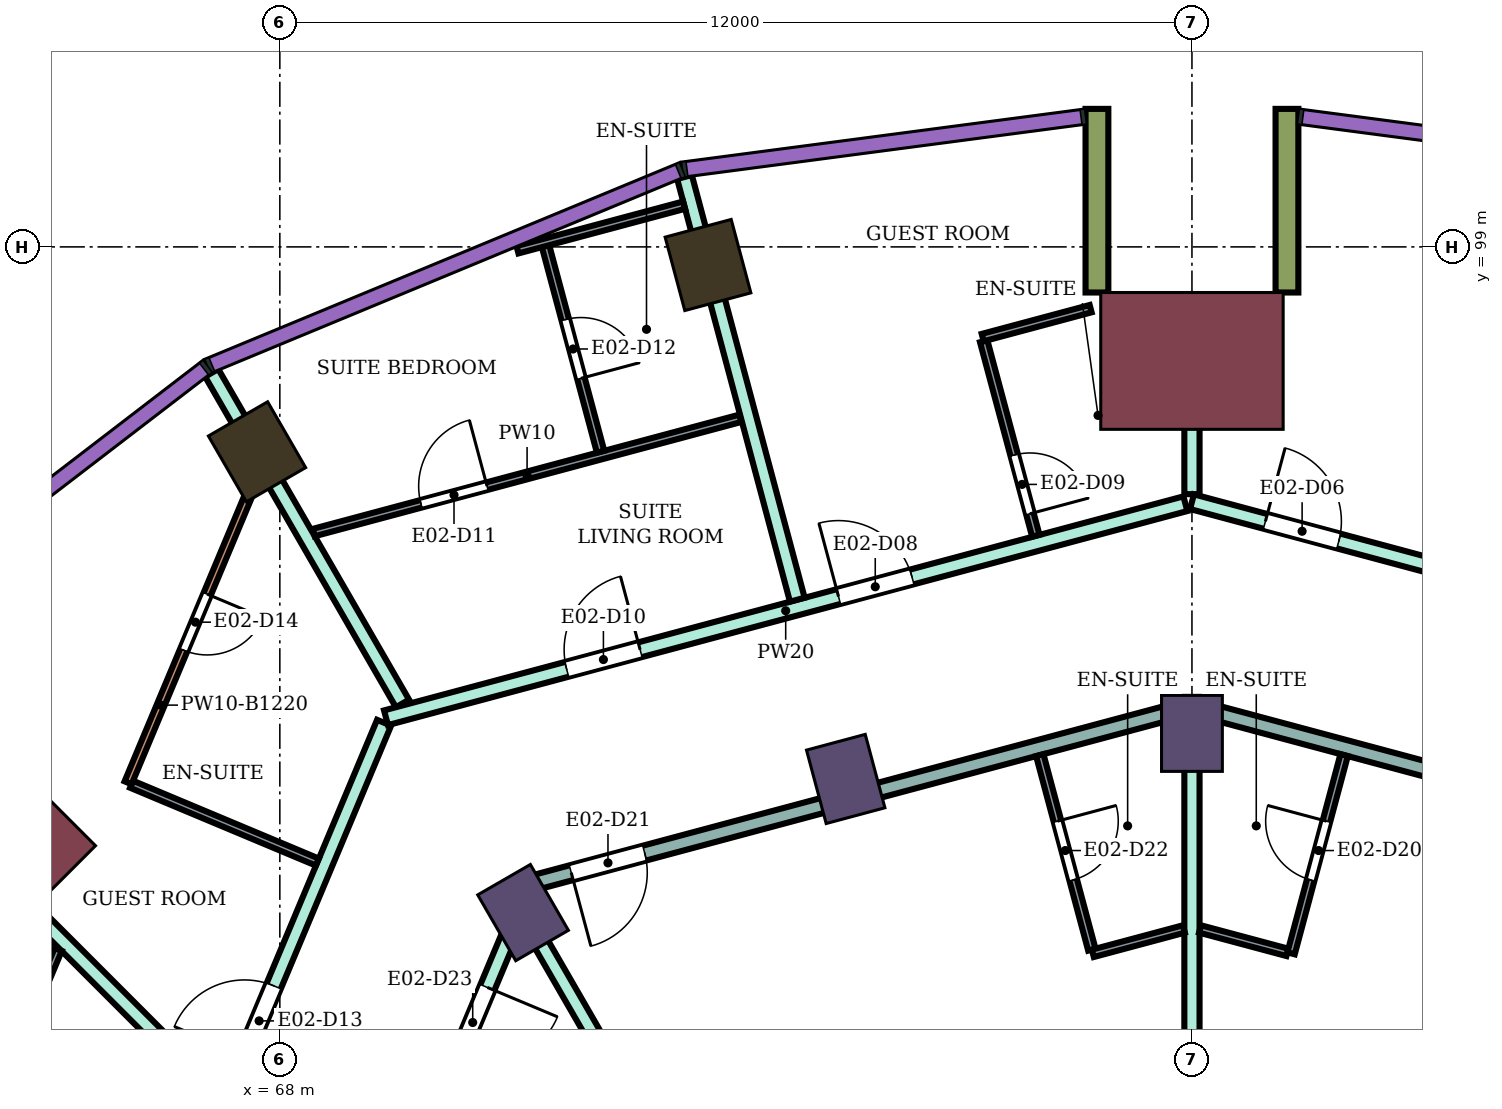
"""IFC4 building model, lengths in metres.
Left out: names, types, materials, properties, quantities, classifications, styles, units other than length and angle.
Written with IfcOpenShell. Run it as: python <this file> out.ifc"""

import sys

from ifc_helpers import new_model, si_unit, direction, frame, frame_2d, origin, origin_2d, place, context, subcontext, project, spatial, rectangle, extrude, element, fill, save


model = new_model("IFC4")
c1 = context("Model", 3, precision=1e-05, world=origin(), true_north=direction((0.0, 1.0)))
c2 = subcontext(c1, "Body", "Model", "MODEL_VIEW")
j1 = project(units=[si_unit("LENGTHUNIT", "METRE"), si_unit("PLANEANGLEUNIT", "RADIAN")], contexts=[c1])
p1 = place(None, origin())
s1 = spatial("IfcSite", under=j1, at=p1, CompositionType="ELEMENT")
p2 = place(p1, origin())
s2 = spatial("IfcBuilding", under=s1, at=p2, CompositionType="ELEMENT")
p3 = place(p2, frame((0.0, 0.0, 126.3)))
s3 = spatial("IfcBuildingStorey", under=s2, at=p3, CompositionType="ELEMENT", Elevation=126.3)
for number, where, z_axis, x_axis in (
    (1, (73.633, 98.762, 0.0), (0.0, 0.0, 1.0), (-0.259, 0.966, 0.0)),
    (2, (67.7, 96.304, 0.0), (0.0, 0.0, 1.0), (-0.5, 0.866, 0.0)),
):
    element("IfcColumn", number, at=place(p3, frame(where, z_axis=z_axis, x_axis=x_axis)), inside=s3, PredefinedType="COLUMN", context=c2, shape_type="SweptSolid", body=[
        extrude(rectangle(XDim=1.0, YDim=0.9, at=origin_2d()), origin(), (0.0, 0.0, 1.0), 3.9),
    ])
for number, where, z_axis, x_axis in (
    (3, (80.0, 92.6, 0.0), (0.0, 0.0, 1.0), (0.0, 1.0, 0.0)),
    (4, (75.445, 92.0, 0.0), (0.0, 0.0, 1.0), (-0.259, 0.966, 0.0)),
    (5, (71.2, 90.242, 0.0), (0.0, 0.0, 1.0), (-0.5, 0.866, 0.0)),
):
    element("IfcColumn", number, at=place(p3, frame(where, z_axis=z_axis, x_axis=x_axis)), inside=s3, PredefinedType="COLUMN", context=c2, shape_type="SweptSolid", body=[
        extrude(rectangle(XDim=1.0, YDim=0.8, at=origin_2d()), origin(), (0.0, 0.0, 1.0), 3.9),
    ])
for number, where, z_axis, x_axis in (
    (6, (80.0, 97.5, 0.0), (0.0, 0.0, 1.0), (0.0, 1.0, 0.0)),
    (7, (64.09, 90.91, 0.0), (0.0, 0.0, 1.0), (-0.707, 0.707, 0.0)),
):
    element("IfcColumn", number, at=place(p3, frame(where, z_axis=z_axis, x_axis=x_axis)), inside=s3, PredefinedType="COLUMN", context=c2, shape_type="SweptSolid", body=[
        extrude(rectangle(XDim=1.8, YDim=2.4, at=origin_2d()), origin(), (0.0, 0.0, 1.0), 3.9),
    ])
for number, where, z_axis, x_axis in (
    (8, (81.25, 98.4, 0.0), (0.0, 0.0, 1.0), (0.0, 1.0, 0.0)),
    (9, (78.75, 98.4, 0.0), (0.0, 0.0, 1.0), (0.0, 1.0, 0.0)),
):
    element("IfcWall", number, at=place(p3, frame(where, z_axis=z_axis, x_axis=x_axis)), inside=s3, PredefinedType="NOTDEFINED", context=c2, shape_type="SweptSolid", body=[
        extrude(rectangle(XDim=2.416, YDim=0.3, at=frame_2d((1.208, 0.0))), origin(), (0.0, 0.0, 1.0), 3.9),
    ])
p4 = place(p3, frame((63.6, 91.409, 0.0), z_axis=(0.0, 0.0, 1.0), x_axis=(0.706937509868, -0.707276011993, 0.0)))
e10 = element("IfcWall", 10, at=p4, inside=s3, PredefinedType="PARTITIONING", context=c2, shape_type="SweptSolid", body=[
    extrude(rectangle(XDim=5.049, YDim=0.2, at=frame_2d((2.524, 0.0))), origin(), (0.0, 0.0, 1.0), 3.45),
])
p5 = place(p3, frame((66.085, 84.9, 0.0), z_axis=(0.0, 0.0, 1.0), x_axis=(0.386617151403, 0.922240303956, 0.0)))
e11 = element("IfcWall", 11, at=p5, inside=s3, PredefinedType="PARTITIONING", context=c2, shape_type="SweptSolid", body=[
    extrude(rectangle(XDim=8.5, YDim=0.2, at=frame_2d((4.25, 0.0))), origin(), (0.0, 0.0, 1.0), 3.45),
])
p6 = place(p5, frame((3.748, 0.0, 0.0)))
e12 = element("IfcOpeningElement", 12, at=p6, cuts=e11, PredefinedType="OPENING", context=c2, shape_type="SweptSolid", body=[
    extrude(rectangle(XDim=1.0, YDim=2.1, at=frame_2d((0.5, 1.05))), frame((0.0, 0.11, 0.0), z_axis=(0.0, -1.0, 0.0), x_axis=(1.0, 0.0, 0.0)), (0.0, 0.0, 1.0), 0.22),
])
p7 = place(p3, frame((67.104, 97.343, 0.0), z_axis=(0.0, 0.0, 1.0), x_axis=(0.499893606134, -0.866086821598, 0.0)))
e13 = element("IfcWall", 13, at=p7, inside=s3, PredefinedType="PARTITIONING", context=c2, shape_type="SweptSolid", body=[
    extrude(rectangle(XDim=5.021, YDim=0.2, at=frame_2d((2.511, 0.0))), origin(), (0.0, 0.0, 1.0), 3.45),
])
p8 = place(p3, frame((68.277, 83.4, 0.0), z_axis=(0.0, 0.0, 1.0), x_axis=(0.386454861164, 0.922308321703, 0.0)))
e14 = element("IfcWall", 14, at=p8, inside=s3, PredefinedType="PARTITIONING", context=c2, shape_type="SweptSolid", body=[
    extrude(rectangle(XDim=7.762, YDim=0.2, at=frame_2d((3.881, 0.0))), origin(), (0.0, 0.0, 1.0), 3.45),
])
p9 = place(p8, frame((5.351, 0.0, 0.0)))
e15 = element("IfcOpeningElement", 15, at=p9, cuts=e14, PredefinedType="OPENING", context=c2, shape_type="SweptSolid", body=[
    extrude(rectangle(XDim=1.0, YDim=2.1, at=frame_2d((0.5, 1.05))), frame((0.0, 0.11, 0.0), z_axis=(0.0, -1.0, 0.0), x_axis=(1.0, 0.0, 0.0)), (0.0, 0.0, 1.0), 0.22),
])
p10 = place(p3, frame((69.397, 92.805, 0.0), z_axis=(0.0, 0.0, 1.0), x_axis=(0.965971666602, 0.258647906087, 0.0)))
e16 = element("IfcWall", 16, at=p10, inside=s3, PredefinedType="PARTITIONING", context=c2, shape_type="SweptSolid", body=[
    extrude(rectangle(XDim=10.887, YDim=0.2, at=frame_2d((5.443, 0.0))), origin(), (0.0, 0.0, 1.0), 3.45),
])
p11 = place(p10, frame((6.163, 0.0, 0.0)))
e17 = element("IfcOpeningElement", 17, at=p11, cuts=e16, PredefinedType="OPENING", context=c2, shape_type="SweptSolid", body=[
    extrude(rectangle(XDim=1.0, YDim=2.1, at=frame_2d((0.5, 1.05))), frame((0.0, 0.11, 0.0), z_axis=(0.0, -1.0, 0.0), x_axis=(1.0, 0.0, 0.0)), (0.0, 0.0, 1.0), 0.22),
])
p12 = place(p10, frame((2.461, 0.0, 0.0)))
e18 = element("IfcOpeningElement", 18, at=p12, cuts=e16, PredefinedType="OPENING", context=c2, shape_type="SweptSolid", body=[
    extrude(rectangle(XDim=1.0, YDim=2.1, at=frame_2d((0.5, 1.05))), frame((0.0, 0.11, 0.0), z_axis=(0.0, -1.0, 0.0), x_axis=(1.0, 0.0, 0.0)), (0.0, 0.0, 1.0), 0.22),
])
p13 = place(p3, frame((71.263, 90.135, 0.0), z_axis=(0.0, 0.0, 1.0), x_axis=(0.499869438034, -0.86610077065, 0.0)))
e19 = element("IfcWall", 19, at=p13, inside=s3, PredefinedType="PARTITIONING", context=c2, shape_type="SweptSolid", body=[
    extrude(rectangle(XDim=9.777, YDim=0.2, at=frame_2d((4.889, 0.0))), origin(), (0.0, 0.0, 1.0), 3.45),
])
p14 = place(p3, frame((71.303, 90.625, 0.0), z_axis=(0.0, 0.0, 1.0), x_axis=(0.965971868307, 0.258647152776, 0.0)))
e20 = element("IfcWall", 20, at=p14, inside=s3, PredefinedType="PARTITIONING", context=c2, shape_type="SweptSolid", body=[
    extrude(rectangle(XDim=8.874, YDim=0.2, at=frame_2d((4.437, 0.0))), origin(), (0.0, 0.0, 1.0), 3.08),
])
p15 = place(p14, frame((0.55, 0.0, 0.0)))
e21 = element("IfcOpeningElement", 21, at=p15, cuts=e20, PredefinedType="OPENING", context=c2, shape_type="SweptSolid", body=[
    extrude(rectangle(XDim=1.0, YDim=2.1, at=frame_2d((0.5, 1.05))), frame((0.0, 0.11, 0.0), z_axis=(0.0, -1.0, 0.0), x_axis=(1.0, 0.0, 0.0)), (0.0, 0.0, 1.0), 0.22),
])
p16 = place(p3, frame((73.324, 99.919, 0.0), z_axis=(0.0, 0.0, 1.0), x_axis=(0.257855371794, -0.966183526685, 0.0)))
e22 = element("IfcWall", 22, at=p16, inside=s3, PredefinedType="PARTITIONING", context=c2, shape_type="SweptSolid", body=[
    extrude(rectangle(XDim=5.756, YDim=0.2, at=frame_2d((2.878, 0.0))), origin(), (0.0, 0.0, 1.0), 3.45),
])
p17 = place(p3, frame((80.0, 82.699, 0.0), z_axis=(0.0, 0.0, 1.0), x_axis=(0.0, 1.0, 0.0)))
e23 = element("IfcWall", 23, at=p17, inside=s3, PredefinedType="PARTITIONING", context=c2, shape_type="SweptSolid", body=[
    extrude(rectangle(XDim=10.125, YDim=0.2, at=frame_2d((5.062, 0.0))), origin(), (0.0, 0.0, 1.0), 3.45),
])
p18 = place(p3, frame((80.0, 92.954, 0.0), z_axis=(0.0, 0.0, 1.0), x_axis=(0.96592536278, -0.258820774936, 0.0)))
e24 = element("IfcWall", 24, at=p18, inside=s3, PredefinedType="PARTITIONING", context=c2, shape_type="SweptSolid", body=[
    extrude(rectangle(XDim=8.934, YDim=0.2, at=frame_2d((4.467, 0.0))), origin(), (0.0, 0.0, 1.0), 3.08),
])
p19 = place(p18, frame((7.454, 0.0, 0.0)))
e25 = element("IfcOpeningElement", 25, at=p19, cuts=e24, PredefinedType="OPENING", context=c2, shape_type="SweptSolid", body=[
    extrude(rectangle(XDim=1.0, YDim=2.1, at=frame_2d((0.5, 1.05))), frame((0.0, 0.11, 0.0), z_axis=(0.0, -1.0, 0.0), x_axis=(1.0, 0.0, 0.0)), (0.0, 0.0, 1.0), 0.22),
])
p20 = place(p3, frame((80.0, 95.747, 0.0), z_axis=(0.0, 0.0, 1.0), x_axis=(0.0, 1.0, 0.0)))
e26 = element("IfcWall", 26, at=p20, inside=s3, PredefinedType="PARTITIONING", context=c2, shape_type="SweptSolid", body=[
    extrude(rectangle(XDim=2.452, YDim=0.2, at=frame_2d((1.226, 0.0))), origin(), (0.0, 0.0, 1.0), 3.45),
])
p21 = place(p3, frame((80.0, 95.648, 0.0), z_axis=(0.0, 0.0, 1.0), x_axis=(0.965852259202, -0.259093445292, 0.0)))
e27 = element("IfcWall", 27, at=p21, inside=s3, PredefinedType="PARTITIONING", context=c2, shape_type="SweptSolid", body=[
    extrude(rectangle(XDim=10.597, YDim=0.2, at=frame_2d((5.298, 0.0))), origin(), (0.0, 0.0, 1.0), 3.45),
])
p22 = place(p21, frame((1.0, 0.0, 0.0)))
e28 = element("IfcOpeningElement", 28, at=p22, cuts=e27, PredefinedType="OPENING", context=c2, shape_type="SweptSolid", body=[
    extrude(rectangle(XDim=1.0, YDim=2.1, at=frame_2d((0.5, 1.05))), frame((0.0, 0.11, 0.0), z_axis=(0.0, -1.0, 0.0), x_axis=(1.0, 0.0, 0.0)), (0.0, 0.0, 1.0), 0.22),
])
p23 = place(p3, frame((63.896, 86.92, 0.0), z_axis=(0.0, 0.0, 1.0), x_axis=(0.386637413037, 0.922231809709, 0.0)))
e29 = element("IfcWall", 29, at=p23, inside=s3, PredefinedType="PARTITIONING", context=c2, shape_type="SweptSolid", body=[
    extrude(rectangle(XDim=3.076, YDim=0.1, at=frame_2d((1.538, 0.0))), origin(), (0.0, 0.0, 1.0), 3.45),
])
p24 = place(p23, frame((1.173, 0.0, 0.0)))
e30 = element("IfcOpeningElement", 30, at=p24, cuts=e29, PredefinedType="OPENING", context=c2, shape_type="SweptSolid", body=[
    extrude(rectangle(XDim=0.8, YDim=2.1, at=frame_2d((0.4, 1.05))), frame((0.0, 0.06, 0.0), z_axis=(0.0, -1.0, 0.0), x_axis=(1.0, 0.0, 0.0)), (0.0, 0.0, 1.0), 0.12),
])
p25 = place(p3, frame((66.049, 91.931, 0.0), z_axis=(0.0, 0.0, 1.0), x_axis=(0.922344808264, -0.38636777126, 0.0)))
e31 = element("IfcWall", 31, at=p25, inside=s3, PredefinedType="PARTITIONING", context=c2, shape_type="SweptSolid", body=[
    extrude(rectangle(XDim=2.65, YDim=0.1, at=frame_2d((1.325, 0.0))), origin(), (0.0, 0.0, 1.0), 3.45),
])
p26 = place(p3, frame((66.004, 91.95, 0.0), z_axis=(0.0, 0.0, 1.0), x_axis=(0.386601257709, 0.922246966673, 0.0)))
e32 = element("IfcWall", 32, at=p26, inside=s3, PredefinedType="PARTITIONING", context=c2, shape_type="SweptSolid", body=[
    extrude(rectangle(XDim=4.433, YDim=0.1, at=frame_2d((2.216, 0.0))), origin(), (0.0, 0.0, 1.0), 2.68),
])
p27 = place(p26, frame((1.891, 0.0, 0.0)))
e33 = element("IfcOpeningElement", 33, at=p27, cuts=e32, PredefinedType="OPENING", context=c2, shape_type="SweptSolid", body=[
    extrude(rectangle(XDim=0.8, YDim=2.1, at=frame_2d((0.4, 1.05))), frame((0.0, 0.06, 0.0), z_axis=(0.0, -1.0, 0.0), x_axis=(1.0, 0.0, 0.0)), (0.0, 0.0, 1.0), 0.12),
])
p28 = place(p3, frame((68.447, 95.242, 0.0), z_axis=(0.0, 0.0, 1.0), x_axis=(0.965958178477, 0.258698274894, 0.0)))
e34 = element("IfcWall", 34, at=p28, inside=s3, PredefinedType="PARTITIONING", context=c2, shape_type="SweptSolid", body=[
    extrude(rectangle(XDim=5.81, YDim=0.1, at=frame_2d((2.905, 0.0))), origin(), (0.0, 0.0, 1.0), 3.45),
])
p29 = place(p28, frame((1.46, 0.0, 0.0)))
e35 = element("IfcOpeningElement", 35, at=p29, cuts=e34, PredefinedType="OPENING", context=c2, shape_type="SweptSolid", body=[
    extrude(rectangle(XDim=0.9, YDim=2.1, at=frame_2d((0.45, 1.05))), frame((0.0, 0.06, 0.0), z_axis=(0.0, -1.0, 0.0), x_axis=(1.0, 0.0, 0.0)), (0.0, 0.0, 1.0), 0.12),
])
p30 = place(p3, frame((71.459, 99.147, 0.0), z_axis=(0.0, 0.0, 1.0), x_axis=(0.258550824249, -0.965997655939, 0.0)))
e36 = element("IfcWall", 36, at=p30, inside=s3, PredefinedType="PARTITIONING", context=c2, shape_type="SweptSolid", body=[
    extrude(rectangle(XDim=2.942, YDim=0.1, at=frame_2d((1.471, 0.0))), origin(), (0.0, 0.0, 1.0), 3.45),
])
p31 = place(p30, frame((1.143, 0.0, 0.0)))
e37 = element("IfcOpeningElement", 37, at=p31, cuts=e36, PredefinedType="OPENING", context=c2, shape_type="SweptSolid", body=[
    extrude(rectangle(XDim=0.8, YDim=2.1, at=frame_2d((0.4, 1.05))), frame((0.0, 0.06, 0.0), z_axis=(0.0, -1.0, 0.0), x_axis=(1.0, 0.0, 0.0)), (0.0, 0.0, 1.0), 0.12),
])
p32 = place(p3, frame((71.126, 98.963, 0.0), z_axis=(0.0, 0.0, 1.0), x_axis=(0.966023883118, 0.258452814352, 0.0)))
e38 = element("IfcWall", 38, at=p32, inside=s3, PredefinedType="PARTITIONING", context=c2, shape_type="SweptSolid", body=[
    extrude(rectangle(XDim=2.269, YDim=0.1, at=frame_2d((1.135, 0.0))), origin(), (0.0, 0.0, 1.0), 3.45),
])
p33 = place(p3, frame((77.26, 97.759, 0.0), z_axis=(0.0, 0.0, 1.0), x_axis=(0.258935674139, -0.965894568086, 0.0)))
e39 = element("IfcWall", 39, at=p33, inside=s3, PredefinedType="PARTITIONING", context=c2, shape_type="SweptSolid", body=[
    extrude(rectangle(XDim=2.649, YDim=0.1, at=frame_2d((1.325, 0.0))), origin(), (0.0, 0.0, 1.0), 3.45),
])
p34 = place(p33, frame((1.55, 0.0, 0.0)))
e40 = element("IfcOpeningElement", 40, at=p34, cuts=e39, PredefinedType="OPENING", context=c2, shape_type="SweptSolid", body=[
    extrude(rectangle(XDim=0.8, YDim=2.1, at=frame_2d((0.4, 1.05))), frame((0.0, 0.06, 0.0), z_axis=(0.0, -1.0, 0.0), x_axis=(1.0, 0.0, 0.0)), (0.0, 0.0, 1.0), 0.12),
])
p35 = place(p3, frame((77.247, 97.807, 0.0), z_axis=(0.0, 0.0, 1.0), x_axis=(0.965900598974, 0.258913176376, 0.0)))
e41 = element("IfcWall", 41, at=p35, inside=s3, PredefinedType="PARTITIONING", context=c2, shape_type="SweptSolid", body=[
    extrude(rectangle(XDim=1.47, YDim=0.1, at=frame_2d((0.735, 0.0))), origin(), (0.0, 0.0, 1.0), 3.45),
])
p36 = place(p3, frame((77.998, 92.314, 0.0), z_axis=(0.0, 0.0, 1.0), x_axis=(0.258608674509, -0.965982170368, 0.0)))
e42 = element("IfcWall", 42, at=p36, inside=s3, PredefinedType="PARTITIONING", context=c2, shape_type="SweptSolid", body=[
    extrude(rectangle(XDim=2.65, YDim=0.1, at=frame_2d((1.325, 0.0))), origin(), (0.0, 0.0, 1.0), 3.45),
])
p37 = place(p36, frame((0.9, 0.0, 0.0)))
e43 = element("IfcOpeningElement", 43, at=p37, cuts=e42, PredefinedType="OPENING", context=c2, shape_type="SweptSolid", body=[
    extrude(rectangle(XDim=0.8, YDim=2.1, at=frame_2d((0.4, 1.05))), frame((0.0, 0.06, 0.0), z_axis=(0.0, -1.0, 0.0), x_axis=(1.0, 0.0, 0.0)), (0.0, 0.0, 1.0), 0.12),
])
p38 = place(p3, frame((78.696, 89.706, 0.0), z_axis=(0.0, 0.0, 1.0), x_axis=(0.966002513606, 0.258532674351, 0.0)))
e44 = element("IfcWall", 44, at=p38, inside=s3, PredefinedType="PARTITIONING", context=c2, shape_type="SweptSolid", body=[
    extrude(rectangle(XDim=1.24, YDim=0.1, at=frame_2d((0.62, 0.0))), origin(), (0.0, 0.0, 1.0), 3.45),
])
p39 = place(p3, frame((80.106, 90.027, 0.0), z_axis=(0.0, 0.0, 1.0), x_axis=(0.966002973184, -0.258530957139, 0.0)))
e45 = element("IfcWall", 45, at=p39, inside=s3, PredefinedType="PARTITIONING", context=c2, shape_type="SweptSolid", body=[
    extrude(rectangle(XDim=1.19, YDim=0.1, at=frame_2d((0.595, 0.0))), origin(), (0.0, 0.0, 1.0), 3.45),
])
p40 = place(p3, frame((81.304, 89.706, 0.0), z_axis=(0.0, 0.0, 1.0), x_axis=(0.258608022684, 0.965982344872, 0.0)))
e46 = element("IfcWall", 46, at=p40, inside=s3, PredefinedType="PARTITIONING", context=c2, shape_type="SweptSolid", body=[
    extrude(rectangle(XDim=2.7, YDim=0.1, at=frame_2d((1.35, 0.0))), origin(), (0.0, 0.0, 1.0), 3.45),
])
p41 = place(p40, frame((1.0, 0.0, 0.0)))
e47 = element("IfcOpeningElement", 47, at=p41, cuts=e46, PredefinedType="OPENING", context=c2, shape_type="SweptSolid", body=[
    extrude(rectangle(XDim=0.8, YDim=2.1, at=frame_2d((0.4, 1.05))), frame((0.0, 0.06, 0.0), z_axis=(0.0, -1.0, 0.0), x_axis=(1.0, 0.0, 0.0)), (0.0, 0.0, 1.0), 0.12),
])
p42 = place(p22, origin())
e48 = element("IfcDoor", 48, at=p42, inside=s3, OperationType="SINGLE_SWING_LEFT", PredefinedType="DOOR", context=c2, shape_type="SweptSolid", body=[
    extrude(rectangle(XDim=1.0, YDim=2.1, at=frame_2d((0.5, 1.05))), frame((0.0, 0.025, 0.0), z_axis=(0.0, -1.0, 0.0), x_axis=(1.0, 0.0, 0.0)), (0.0, 0.0, 1.0), 0.05),
])
fill(e28, e48)
p43 = place(p11, origin())
e49 = element("IfcDoor", 49, at=p43, inside=s3, OperationType="SINGLE_SWING_LEFT", PredefinedType="DOOR", context=c2, shape_type="SweptSolid", body=[
    extrude(rectangle(XDim=1.0, YDim=2.1, at=frame_2d((0.5, 1.05))), frame((0.0, 0.025, 0.0), z_axis=(0.0, -1.0, 0.0), x_axis=(1.0, 0.0, 0.0)), (0.0, 0.0, 1.0), 0.05),
])
fill(e17, e49)
p44 = place(p34, origin())
e50 = element("IfcDoor", 50, at=p44, inside=s3, OperationType="SINGLE_SWING_RIGHT", PredefinedType="DOOR", context=c2, shape_type="SweptSolid", body=[
    extrude(rectangle(XDim=0.8, YDim=2.1, at=frame_2d((0.4, 1.05))), frame((0.0, 0.025, 0.0), z_axis=(0.0, -1.0, 0.0), x_axis=(1.0, 0.0, 0.0)), (0.0, 0.0, 1.0), 0.05),
])
fill(e40, e50)
p45 = place(p12, origin())
e51 = element("IfcDoor", 51, at=p45, inside=s3, OperationType="SINGLE_SWING_RIGHT", PredefinedType="DOOR", context=c2, shape_type="SweptSolid", body=[
    extrude(rectangle(XDim=1.0, YDim=2.1, at=frame_2d((0.5, 1.05))), frame((0.0, 0.025, 0.0), z_axis=(0.0, -1.0, 0.0), x_axis=(1.0, 0.0, 0.0)), (0.0, 0.0, 1.0), 0.05),
])
fill(e18, e51)
p46 = place(p29, origin())
e52 = element("IfcDoor", 52, at=p46, inside=s3, OperationType="SINGLE_SWING_RIGHT", PredefinedType="DOOR", context=c2, shape_type="SweptSolid", body=[
    extrude(rectangle(XDim=0.9, YDim=2.1, at=frame_2d((0.45, 1.05))), frame((0.0, 0.025, 0.0), z_axis=(0.0, -1.0, 0.0), x_axis=(1.0, 0.0, 0.0)), (0.0, 0.0, 1.0), 0.05),
])
fill(e35, e52)
p47 = place(p31, origin())
e53 = element("IfcDoor", 53, at=p47, inside=s3, OperationType="SINGLE_SWING_RIGHT", PredefinedType="DOOR", context=c2, shape_type="SweptSolid", body=[
    extrude(rectangle(XDim=0.8, YDim=2.1, at=frame_2d((0.4, 1.05))), frame((0.0, 0.025, 0.0), z_axis=(0.0, -1.0, 0.0), x_axis=(1.0, 0.0, 0.0)), (0.0, 0.0, 1.0), 0.05),
])
fill(e37, e53)
p48 = place(p6, origin())
e54 = element("IfcDoor", 54, at=p48, inside=s3, OperationType="SINGLE_SWING_LEFT", PredefinedType="DOOR", context=c2, shape_type="SweptSolid", body=[
    extrude(rectangle(XDim=1.0, YDim=2.1, at=frame_2d((0.5, 1.05))), frame((0.0, 0.025, 0.0), z_axis=(0.0, -1.0, 0.0), x_axis=(1.0, 0.0, 0.0)), (0.0, 0.0, 1.0), 0.05),
])
fill(e12, e54)
p49 = place(p27, frame((0.8, 0.0, 0.0), z_axis=(0.0, 0.0, 1.0), x_axis=(-1.0, 0.0, 0.0)))
e55 = element("IfcDoor", 55, at=p49, inside=s3, OperationType="SINGLE_SWING_LEFT", PredefinedType="DOOR", context=c2, shape_type="SweptSolid", body=[
    extrude(rectangle(XDim=0.8, YDim=2.1, at=frame_2d((0.4, 1.05))), frame((0.0, 0.025, 0.0), z_axis=(0.0, -1.0, 0.0), x_axis=(1.0, 0.0, 0.0)), (0.0, 0.0, 1.0), 0.05),
])
fill(e33, e55)
p50 = place(p41, origin())
e56 = element("IfcDoor", 56, at=p50, inside=s3, OperationType="SINGLE_SWING_RIGHT", PredefinedType="DOOR", context=c2, shape_type="SweptSolid", body=[
    extrude(rectangle(XDim=0.8, YDim=2.1, at=frame_2d((0.4, 1.05))), frame((0.0, 0.025, 0.0), z_axis=(0.0, -1.0, 0.0), x_axis=(1.0, 0.0, 0.0)), (0.0, 0.0, 1.0), 0.05),
])
fill(e47, e56)
p51 = place(p15, frame((1.0, 0.0, 0.0), z_axis=(0.0, 0.0, 1.0), x_axis=(-1.0, 0.0, 0.0)))
e57 = element("IfcDoor", 57, at=p51, inside=s3, OperationType="SINGLE_SWING_RIGHT", PredefinedType="DOOR", context=c2, shape_type="SweptSolid", body=[
    extrude(rectangle(XDim=1.0, YDim=2.1, at=frame_2d((0.5, 1.05))), frame((0.0, 0.025, 0.0), z_axis=(0.0, -1.0, 0.0), x_axis=(1.0, 0.0, 0.0)), (0.0, 0.0, 1.0), 0.05),
])
fill(e21, e57)
p52 = place(p37, origin())
e58 = element("IfcDoor", 58, at=p52, inside=s3, OperationType="SINGLE_SWING_LEFT", PredefinedType="DOOR", context=c2, shape_type="SweptSolid", body=[
    extrude(rectangle(XDim=0.8, YDim=2.1, at=frame_2d((0.4, 1.05))), frame((0.0, 0.025, 0.0), z_axis=(0.0, -1.0, 0.0), x_axis=(1.0, 0.0, 0.0)), (0.0, 0.0, 1.0), 0.05),
])
fill(e43, e58)
p53 = place(p9, frame((1.0, 0.0, 0.0), z_axis=(0.0, 0.0, 1.0), x_axis=(-1.0, 0.0, 0.0)))
e59 = element("IfcDoor", 59, at=p53, inside=s3, OperationType="SINGLE_SWING_LEFT", PredefinedType="DOOR", context=c2, shape_type="SweptSolid", body=[
    extrude(rectangle(XDim=1.0, YDim=2.1, at=frame_2d((0.5, 1.05))), frame((0.0, 0.025, 0.0), z_axis=(0.0, -1.0, 0.0), x_axis=(1.0, 0.0, 0.0)), (0.0, 0.0, 1.0), 0.05),
])
fill(e15, e59)
save(model, sys.argv[1])
